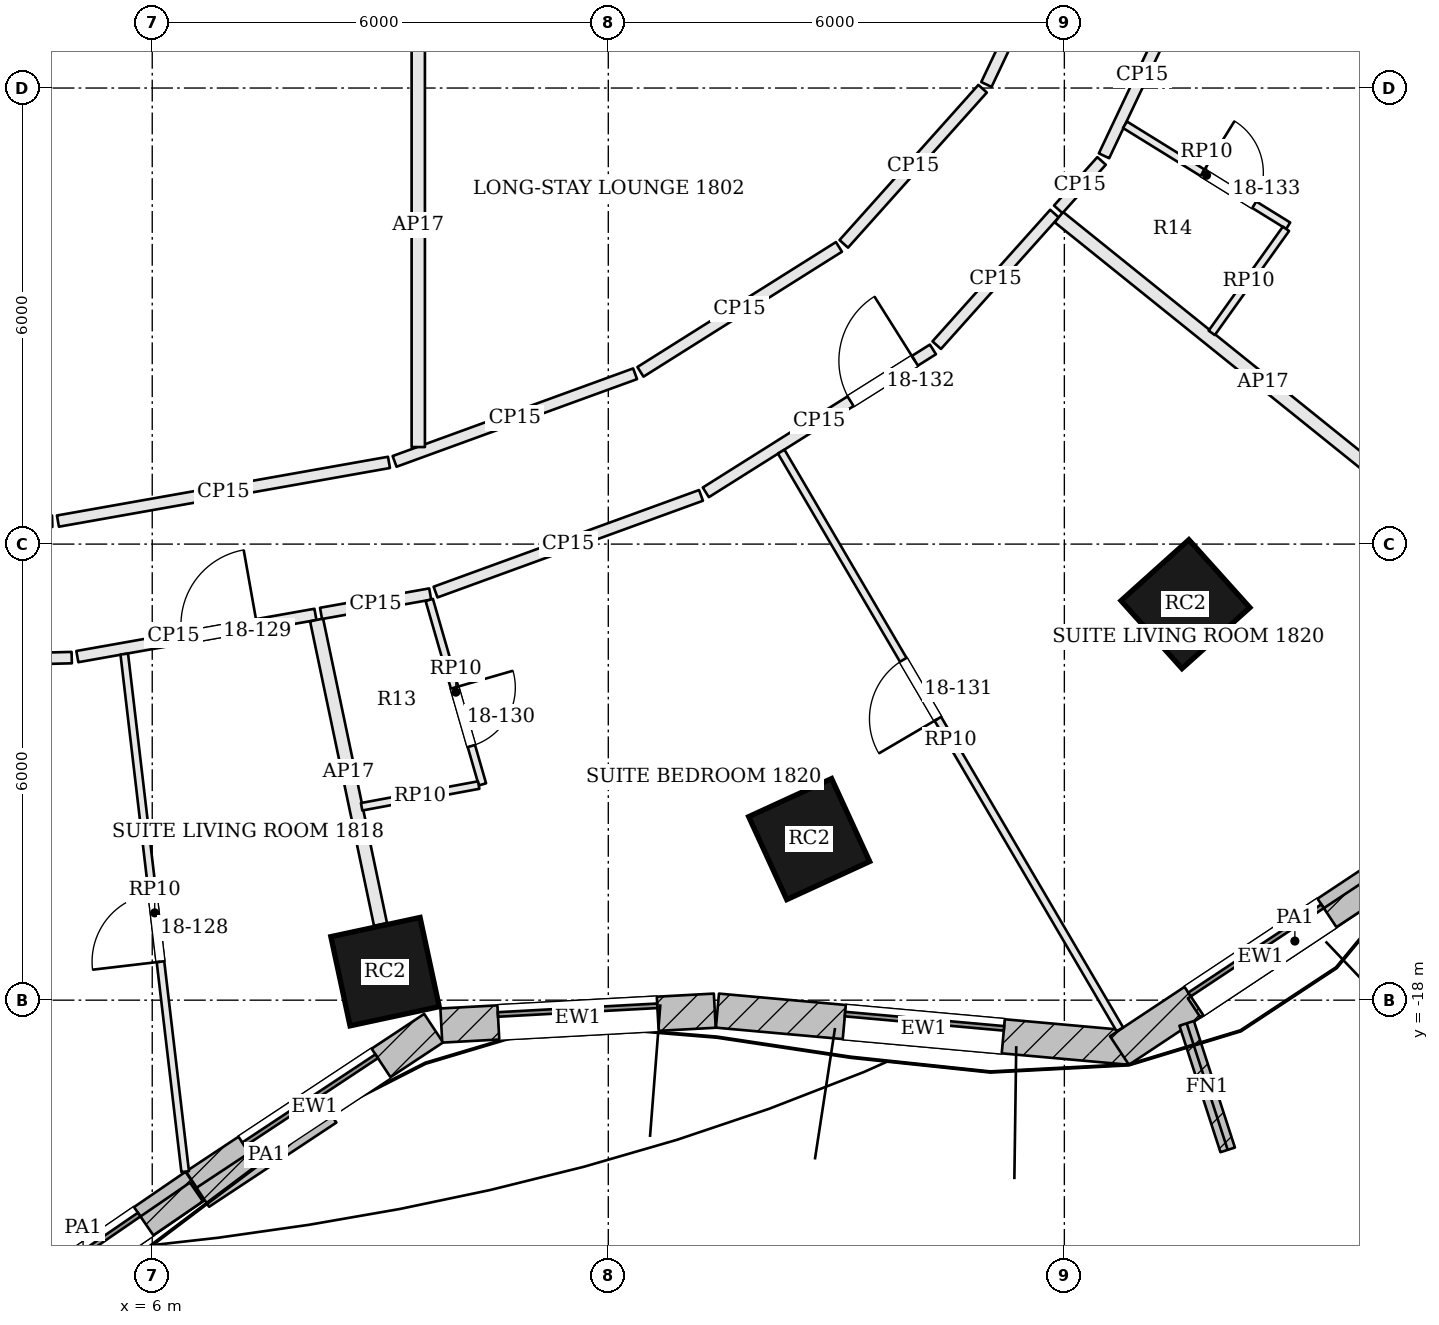
"""IFC4 building model, lengths in metres.
Left out: names, types, materials, properties, quantities, classifications, styles, units other than length and angle.
Written with IfcOpenShell. Run it as: python <this file> out.ifc"""

import sys

from ifc_helpers import new_model, si_unit, direction, frame, frame_2d, origin, origin_2d, place, context, subcontext, project, spatial, rectangle, extrude, element, fill, save


model = new_model("IFC4")
c1 = context("Model", 3, precision=1e-05, world=origin(), true_north=direction((0.0, 1.0)))
c2 = subcontext(c1, "Body", "Model", "MODEL_VIEW")
j1 = project(units=[si_unit("LENGTHUNIT", "METRE"), si_unit("PLANEANGLEUNIT", "RADIAN")], contexts=[c1])
p1 = place(None, origin())
s1 = spatial("IfcSite", under=j1, at=p1, CompositionType="ELEMENT")
p2 = place(p1, origin())
s2 = spatial("IfcBuilding", under=s1, at=p2, CompositionType="ELEMENT")
p3 = place(p2, frame((0.0, 0.0, 81.6)))
s3 = spatial("IfcBuildingStorey", under=s2, at=p3, CompositionType="ELEMENT", Elevation=81.6)
for number, where, z_axis, x_axis in (
    (1, (9.063, -17.625, -0.7), (0.0, 0.0, 1.0), (0.978, 0.21, 0.0)),
    (2, (14.643, -15.881, -0.7), (0.0, 0.0, 1.0), (0.909, 0.417, 0.0)),
    (3, (19.593, -12.79, -0.7), (0.0, 0.0, 1.0), (0.744, 0.668, 0.0)),
):
    element("IfcColumn", number, at=place(p3, frame(where, z_axis=z_axis, x_axis=x_axis)), inside=s3, PredefinedType="COLUMN", context=c2, shape_type="SweptSolid", body=[
        extrude(rectangle(XDim=1.2, YDim=1.2, at=origin_2d()), origin(), (0.0, 0.0, 1.0), 4.3),
    ])
p4 = place(p3, frame((3.479, -22.56, 0.0), z_axis=(0.0, 0.0, 1.0), x_axis=(0.824722766417, 0.565537230033, 0.0)))
e4 = element("IfcWall", 4, at=p4, inside=s3, PredefinedType="SOLIDWALL", context=c2, shape_type="SweptSolid", body=[
    extrude(rectangle(XDim=3.742, YDim=0.45, at=frame_2d((1.871, 0.0))), origin(), (0.0, 0.0, 1.0), 3.4),
])
p5 = place(p4, frame((0.821, 0.0, 0.9)))
e5 = element("IfcOpeningElement", 5, at=p5, cuts=e4, PredefinedType="OPENING", context=c2, shape_type="SweptSolid", body=[
    extrude(rectangle(XDim=2.1, YDim=2.0, at=frame_2d((1.05, 1.0))), frame((0.0, 0.235, 0.0), z_axis=(0.0, -1.0, 0.0), x_axis=(1.0, 0.0, 0.0)), (0.0, 0.0, 1.0), 0.47),
])
p6 = place(p3, frame((6.568, -20.441, 0.0), z_axis=(0.0, 0.0, 1.0), x_axis=(0.834034214531, 0.551712723246, 0.0)))
e6 = element("IfcWall", 6, at=p6, inside=s3, PredefinedType="SOLIDWALL", context=c2, shape_type="SweptSolid", body=[
    extrude(rectangle(XDim=3.757, YDim=0.45, at=frame_2d((1.879, 0.0))), origin(), (0.0, 0.0, 1.0), 3.4),
])
p7 = place(p6, frame((0.829, 0.0, 0.9)))
e7 = element("IfcOpeningElement", 7, at=p7, cuts=e6, PredefinedType="OPENING", context=c2, shape_type="SweptSolid", body=[
    extrude(rectangle(XDim=2.1, YDim=2.0, at=frame_2d((1.05, 1.0))), frame((0.0, 0.235, 0.0), z_axis=(0.0, -1.0, 0.0), x_axis=(1.0, 0.0, 0.0)), (0.0, 0.0, 1.0), 0.47),
])
p8 = place(p3, frame((9.803, -18.334, 0.0), z_axis=(0.0, 0.0, 1.0), x_axis=(0.998525941495, 0.054276552602, 0.0)))
e8 = element("IfcWall", 8, at=p8, inside=s3, PredefinedType="SOLIDWALL", context=c2, shape_type="SweptSolid", body=[
    extrude(rectangle(XDim=3.603, YDim=0.45, at=frame_2d((1.802, 0.0))), origin(), (0.0, 0.0, 1.0), 3.4),
])
p9 = place(p8, frame((0.751, 0.0, 0.9)))
e9 = element("IfcOpeningElement", 9, at=p9, cuts=e8, PredefinedType="OPENING", context=c2, shape_type="SweptSolid", body=[
    extrude(rectangle(XDim=2.1, YDim=2.0, at=frame_2d((1.05, 1.0))), frame((0.0, 0.235, 0.0), z_axis=(0.0, -1.0, 0.0), x_axis=(1.0, 0.0, 0.0)), (0.0, 0.0, 1.0), 0.47),
])
p10 = place(p3, frame((13.436, -18.138, 0.0), z_axis=(0.0, 0.0, 1.0), x_axis=(0.99598810213, -0.089485755376, 0.0)))
e10 = element("IfcWall", 10, at=p10, inside=s3, PredefinedType="SOLIDWALL", context=c2, shape_type="SweptSolid", body=[
    extrude(rectangle(XDim=5.451, YDim=0.45, at=frame_2d((2.726, 0.0))), origin(), (0.0, 0.0, 1.0), 3.4),
])
p11 = place(p10, frame((1.676, 0.0, 0.9)))
e11 = element("IfcOpeningElement", 11, at=p11, cuts=e10, PredefinedType="OPENING", context=c2, shape_type="SweptSolid", body=[
    extrude(rectangle(XDim=2.1, YDim=2.0, at=frame_2d((1.05, 1.0))), frame((0.0, 0.235, 0.0), z_axis=(0.0, -1.0, 0.0), x_axis=(1.0, 0.0, 0.0)), (0.0, 0.0, 1.0), 0.47),
])
p12 = place(p3, frame((18.726, -18.663, 0.0), z_axis=(0.0, 0.0, 1.0), x_axis=(0.83333921474, 0.552761931736, 0.0)))
e12 = element("IfcWall", 12, at=p12, inside=s3, PredefinedType="SOLIDWALL", context=c2, shape_type="SweptSolid", body=[
    extrude(rectangle(XDim=4.451, YDim=0.45, at=frame_2d((2.225, 0.0))), origin(), (0.0, 0.0, 1.0), 3.4),
])
p13 = place(p12, frame((1.175, 0.0, 0.9)))
e13 = element("IfcOpeningElement", 13, at=p13, cuts=e12, PredefinedType="OPENING", context=c2, shape_type="SweptSolid", body=[
    extrude(rectangle(XDim=2.1, YDim=2.0, at=frame_2d((1.05, 1.0))), frame((0.0, 0.235, 0.0), z_axis=(0.0, -1.0, 0.0), x_axis=(1.0, 0.0, 0.0)), (0.0, 0.0, 1.0), 0.47),
])
p14 = place(p3, frame((19.609, -18.305, 0.0), z_axis=(0.0, 0.0, 1.0), x_axis=(0.308600224758, -0.951191832008, 0.0)))
e14 = element("IfcWall", 14, at=p14, inside=s3, PredefinedType="SOLIDWALL", context=c2, shape_type="SweptSolid", body=[
    extrude(rectangle(XDim=1.75, YDim=0.2, at=frame_2d((0.875, 0.0))), origin(), (0.0, 0.0, 1.0), 3.4),
])
p15 = place(p3, frame((3.599, -22.568, 3.6), z_axis=(0.0, 0.0, 1.0), x_axis=(0.82476034254, 0.565482428881, 0.0)))
e15 = element("IfcWall", 15, at=p15, inside=s3, PredefinedType="PARAPET", context=c2, shape_type="SweptSolid", body=[
    extrude(rectangle(XDim=3.616, YDim=0.3, at=frame_2d((1.808, 0.0))), origin(), (0.0, 0.0, 1.0), 1.1),
])
p16 = place(p3, frame((6.665, -20.593, 3.6), z_axis=(0.0, 0.0, 1.0), x_axis=(0.834027642059, 0.551722658843, 0.0)))
e16 = element("IfcWall", 16, at=p16, inside=s3, PredefinedType="PARAPET", context=c2, shape_type="SweptSolid", body=[
    extrude(rectangle(XDim=2.008, YDim=0.3, at=frame_2d((1.004, 0.0))), origin(), (0.0, 0.0, 1.0), 1.1),
])
p17 = place(p3, frame((19.708, -18.101, 3.6), z_axis=(0.0, 0.0, 1.0), x_axis=(0.833370664286, 0.552714515738, 0.0)))
e17 = element("IfcWall", 17, at=p17, inside=s3, PredefinedType="PARAPET", context=c2, shape_type="SweptSolid", body=[
    extrude(rectangle(XDim=3.18, YDim=0.3, at=frame_2d((1.59, 0.0))), origin(), (0.0, 0.0, 1.0), 1.1),
])
p18 = place(p3, frame((0.132, -13.618, 0.0), z_axis=(0.0, 0.0, 1.0), x_axis=(0.999664963682, 0.025883593008, 0.0)))
e18 = element("IfcWall", 18, at=p18, inside=s3, PredefinedType="PARTITIONING", context=c2, shape_type="SweptSolid", body=[
    extrude(rectangle(XDim=4.811, YDim=0.15, at=frame_2d((2.405, 0.0))), origin(), (0.0, 0.0, 1.0), 2.784),
])
p19 = place(p3, frame((5.015, -13.48, 0.0), z_axis=(0.0, 0.0, 1.0), x_axis=(0.984640294338, 0.174595219768, 0.0)))
e19 = element("IfcWall", 19, at=p19, inside=s3, PredefinedType="PARTITIONING", context=c2, shape_type="SweptSolid", body=[
    extrude(rectangle(XDim=3.181, YDim=0.15, at=frame_2d((1.591, 0.0))), origin(), (0.0, 0.0, 1.0), 2.784),
])
p20 = place(p19, frame((1.4, 0.0, 0.0)))
e20 = element("IfcOpeningElement", 20, at=p20, cuts=e19, PredefinedType="OPENING", context=c2, shape_type="SweptSolid", body=[
    extrude(rectangle(XDim=1.0, YDim=2.1, at=frame_2d((0.5, 1.05))), frame((0.0, 0.085, 0.0), z_axis=(0.0, -1.0, 0.0), x_axis=(1.0, 0.0, 0.0)), (0.0, 0.0, 1.0), 0.17),
])
p21 = place(p3, frame((9.003, -17.004, 0.0), z_axis=(0.0, 0.0, 1.0), x_axis=(-0.205490383359, 0.978659134912, 0.0)))
e21 = element("IfcWall", 21, at=p21, inside=s3, PredefinedType="PARTITIONING", context=c2, shape_type="SweptSolid", body=[
    extrude(rectangle(XDim=4.093, YDim=0.175, at=frame_2d((2.046, 0.0))), origin(), (0.0, 0.0, 1.0), 2.784),
])
p22 = place(p3, frame((8.221, -12.912, 0.0), z_axis=(0.0, 0.0, 1.0), x_axis=(0.984645082055, 0.174568216995, 0.0)))
e22 = element("IfcWall", 22, at=p22, inside=s3, PredefinedType="PARTITIONING", context=c2, shape_type="SweptSolid", body=[
    extrude(rectangle(XDim=1.459, YDim=0.15, at=frame_2d((0.729, 0.0))), origin(), (0.0, 0.0, 1.0), 2.784),
])
p23 = place(p3, frame((9.728, -12.631, 0.0), z_axis=(0.0, 0.0, 1.0), x_axis=(0.939626438181, 0.342201923826, 0.0)))
e23 = element("IfcWall", 23, at=p23, inside=s3, PredefinedType="PARTITIONING", context=c2, shape_type="SweptSolid", body=[
    extrude(rectangle(XDim=3.716, YDim=0.15, at=frame_2d((1.858, 0.0))), origin(), (0.0, 0.0, 1.0), 2.784),
])
p24 = place(p3, frame((13.283, -11.319, 0.0), z_axis=(0.0, 0.0, 1.0), x_axis=(0.84630789582, 0.532694044901, 0.0)))
e24 = element("IfcWall", 24, at=p24, inside=s3, PredefinedType="PARTITIONING", context=c2, shape_type="SweptSolid", body=[
    extrude(rectangle(XDim=3.53, YDim=0.15, at=frame_2d((1.765, 0.0))), origin(), (0.0, 0.0, 1.0), 2.784),
])
p25 = place(p24, frame((2.25, 0.0, 0.0)))
e25 = element("IfcOpeningElement", 25, at=p25, cuts=e24, PredefinedType="OPENING", context=c2, shape_type="SweptSolid", body=[
    extrude(rectangle(XDim=1.0, YDim=2.1, at=frame_2d((0.5, 1.05))), frame((0.0, 0.085, 0.0), z_axis=(0.0, -1.0, 0.0), x_axis=(1.0, 0.0, 0.0)), (0.0, 0.0, 1.0), 0.17),
])
p26 = place(p3, frame((16.321, -9.383, 0.0), z_axis=(0.0, 0.0, 1.0), x_axis=(0.666871661175, 0.745172589083, 0.0)))
e26 = element("IfcWall", 26, at=p26, inside=s3, PredefinedType="PARTITIONING", context=c2, shape_type="SweptSolid", body=[
    extrude(rectangle(XDim=2.323, YDim=0.15, at=frame_2d((1.162, 0.0))), origin(), (0.0, 0.0, 1.0), 2.784),
])
p27 = place(p3, frame((23.302, -12.023, 0.0), z_axis=(0.0, 0.0, 1.0), x_axis=(-0.779049211338, 0.626962779049, 0.0)))
e27 = element("IfcWall", 27, at=p27, inside=s3, PredefinedType="PARTITIONING", context=c2, shape_type="SweptSolid", body=[
    extrude(rectangle(XDim=6.898, YDim=0.175, at=frame_2d((3.449, 0.0))), origin(), (0.0, 0.0, 1.0), 2.784),
])
p28 = place(p3, frame((17.92, -7.596, 0.0), z_axis=(0.0, 0.0, 1.0), x_axis=(0.666719674525, 0.745308577437, 0.0)))
e28 = element("IfcWall", 28, at=p28, inside=s3, PredefinedType="PARTITIONING", context=c2, shape_type="SweptSolid", body=[
    extrude(rectangle(XDim=0.854, YDim=0.15, at=frame_2d((0.427, 0.0))), origin(), (0.0, 0.0, 1.0), 2.784),
])
p29 = place(p3, frame((18.522, -6.891, 0.0), z_axis=(0.0, 0.0, 1.0), x_axis=(0.428157819028, 0.903703979191, 0.0)))
e29 = element("IfcWall", 29, at=p29, inside=s3, PredefinedType="PARTITIONING", context=c2, shape_type="SweptSolid", body=[
    extrude(rectangle(XDim=2.349, YDim=0.15, at=frame_2d((1.175, 0.0))), origin(), (0.0, 0.0, 1.0), 2.784),
])
p30 = place(p3, frame((17.79, -4.231, 0.0), z_axis=(0.0, 0.0, 1.0), x_axis=(-0.428042272357, -0.90375871397, 0.0)))
e30 = element("IfcWall", 30, at=p30, inside=s3, PredefinedType="PARTITIONING", context=c2, shape_type="SweptSolid", body=[
    extrude(rectangle(XDim=1.905, YDim=0.15, at=frame_2d((0.953, 0.0))), origin(), (0.0, 0.0, 1.0), 2.784),
])
p31 = place(p3, frame((16.925, -6.009, 0.0), z_axis=(0.0, 0.0, 1.0), x_axis=(-0.666893859891, -0.745152722359, 0.0)))
e31 = element("IfcWall", 31, at=p31, inside=s3, PredefinedType="PARTITIONING", context=c2, shape_type="SweptSolid", body=[
    extrude(rectangle(XDim=2.739, YDim=0.15, at=frame_2d((1.37, 0.0))), origin(), (0.0, 0.0, 1.0), 2.784),
])
p32 = place(p3, frame((15.034, -8.09, 0.0), z_axis=(0.0, 0.0, 1.0), x_axis=(-0.846322679414, -0.532670557014, 0.0)))
e32 = element("IfcWall", 32, at=p32, inside=s3, PredefinedType="PARTITIONING", context=c2, shape_type="SweptSolid", body=[
    extrude(rectangle(XDim=3.085, YDim=0.15, at=frame_2d((1.543, 0.0))), origin(), (0.0, 0.0, 1.0), 2.784),
])
p33 = place(p3, frame((12.353, -9.76, 0.0), z_axis=(0.0, 0.0, 1.0), x_axis=(-0.939632450309, -0.342185415127, 0.0)))
e33 = element("IfcWall", 33, at=p33, inside=s3, PredefinedType="PARTITIONING", context=c2, shape_type="SweptSolid", body=[
    extrude(rectangle(XDim=3.368, YDim=0.15, at=frame_2d((1.684, 0.0))), origin(), (0.0, 0.0, 1.0), 2.784),
])
p34 = place(p3, frame((9.115, -10.925, 0.0), z_axis=(0.0, 0.0, 1.0), x_axis=(-0.984632605417, -0.174638576352, 0.0)))
e34 = element("IfcWall", 34, at=p34, inside=s3, PredefinedType="PARTITIONING", context=c2, shape_type="SweptSolid", body=[
    extrude(rectangle(XDim=4.423, YDim=0.15, at=frame_2d((2.211, 0.0))), origin(), (0.0, 0.0, 1.0), 2.784),
])
p35 = place(p3, frame((4.684, -11.699, 0.0), z_axis=(0.0, 0.0, 1.0), x_axis=(-0.999663438204, -0.025942442425, 0.0)))
e35 = element("IfcWall", 35, at=p35, inside=s3, PredefinedType="PARTITIONING", context=c2, shape_type="SweptSolid", body=[
    extrude(rectangle(XDim=6.663, YDim=0.15, at=frame_2d((3.332, 0.0))), origin(), (0.0, 0.0, 1.0), 2.784),
])
p36 = place(p3, frame((6.433, -20.256, 0.0), z_axis=(0.0, 0.0, 1.0), x_axis=(-0.116866039573, 0.993147687303, 0.0)))
e36 = element("IfcWall", 36, at=p36, inside=s3, PredefinedType="PARTITIONING", context=c2, shape_type="SweptSolid", body=[
    extrude(rectangle(XDim=6.856, YDim=0.1, at=frame_2d((3.428, 0.0))), origin(), (0.0, 0.0, 1.0), 2.784),
])
p37 = place(p36, frame((2.781, 0.0, 0.0)))
e37 = element("IfcOpeningElement", 37, at=p37, cuts=e36, PredefinedType="OPENING", context=c2, shape_type="SweptSolid", body=[
    extrude(rectangle(XDim=0.9, YDim=2.4, at=frame_2d((0.45, 1.2))), frame((0.0, 0.06, 0.0), z_axis=(0.0, -1.0, 0.0), x_axis=(1.0, 0.0, 0.0)), (0.0, 0.0, 1.0), 0.12),
])
p38 = place(p3, frame((18.73, -18.384, 0.0), z_axis=(0.0, 0.0, 1.0), x_axis=(-0.50573941389, 0.862686295961, 0.0)))
e38 = element("IfcWall", 38, at=p38, inside=s3, PredefinedType="PARTITIONING", context=c2, shape_type="SweptSolid", body=[
    extrude(rectangle(XDim=8.81, YDim=0.1, at=frame_2d((4.405, 0.0))), origin(), (0.0, 0.0, 1.0), 2.784),
])
p39 = place(p38, frame((4.735, 0.0, 0.0)))
e39 = element("IfcOpeningElement", 39, at=p39, cuts=e38, PredefinedType="OPENING", context=c2, shape_type="SweptSolid", body=[
    extrude(rectangle(XDim=0.9, YDim=2.4, at=frame_2d((0.45, 1.2))), frame((0.0, 0.06, 0.0), z_axis=(0.0, -1.0, 0.0), x_axis=(1.0, 0.0, 0.0)), (0.0, 0.0, 1.0), 0.12),
])
p40 = place(p3, frame((9.645, -12.735, 0.0), z_axis=(0.0, 0.0, 1.0), x_axis=(0.27694262008, -0.960886458008, 0.0)))
e40 = element("IfcWall", 40, at=p40, inside=s3, PredefinedType="PARTITIONING", context=c2, shape_type="SweptSolid", body=[
    extrude(rectangle(XDim=2.525, YDim=0.1, at=frame_2d((1.262, 0.0))), origin(), (0.0, 0.0, 1.0), 2.784),
])
p41 = place(p40, frame((1.2, 0.0, 0.0)))
e41 = element("IfcOpeningElement", 41, at=p41, cuts=e40, PredefinedType="OPENING", context=c2, shape_type="SweptSolid", body=[
    extrude(rectangle(XDim=0.8, YDim=2.1, at=frame_2d((0.4, 1.05))), frame((0.0, 0.06, 0.0), z_axis=(0.0, -1.0, 0.0), x_axis=(1.0, 0.0, 0.0)), (0.0, 0.0, 1.0), 0.12),
])
p42 = place(p3, frame((10.295, -15.17, 0.0), z_axis=(0.0, 0.0, 1.0), x_axis=(-0.983258222596, -0.182217638271, 0.0)))
e42 = element("IfcWall", 42, at=p42, inside=s3, PredefinedType="PARTITIONING", context=c2, shape_type="SweptSolid", body=[
    extrude(rectangle(XDim=1.566, YDim=0.1, at=frame_2d((0.783, 0.0))), origin(), (0.0, 0.0, 1.0), 2.784),
])
p43 = place(p3, frame((18.798, -6.483, 0.0), z_axis=(0.0, 0.0, 1.0), x_axis=(0.850374338708, -0.526178186612, 0.0)))
e43 = element("IfcWall", 43, at=p43, inside=s3, PredefinedType="PARTITIONING", context=c2, shape_type="SweptSolid", body=[
    extrude(rectangle(XDim=2.525, YDim=0.1, at=frame_2d((1.263, 0.0))), origin(), (0.0, 0.0, 1.0), 2.784),
])
p44 = place(p43, frame((1.2, 0.0, 0.0)))
e44 = element("IfcOpeningElement", 44, at=p44, cuts=e43, PredefinedType="OPENING", context=c2, shape_type="SweptSolid", body=[
    extrude(rectangle(XDim=0.8, YDim=2.1, at=frame_2d((0.4, 1.05))), frame((0.0, 0.06, 0.0), z_axis=(0.0, -1.0, 0.0), x_axis=(1.0, 0.0, 0.0)), (0.0, 0.0, 1.0), 0.12),
])
p45 = place(p3, frame((20.916, -7.852, 0.0), z_axis=(0.0, 0.0, 1.0), x_axis=(-0.580922254291, -0.813959049627, 0.0)))
e45 = element("IfcWall", 45, at=p45, inside=s3, PredefinedType="PARTITIONING", context=c2, shape_type="SweptSolid", body=[
    extrude(rectangle(XDim=1.681, YDim=0.1, at=frame_2d((0.841, 0.0))), origin(), (0.0, 0.0, 1.0), 2.784),
])
p46 = place(p3, frame((9.5, -10.723, 0.0), z_axis=(0.0, 0.0, 1.0), x_axis=(0.0, 1.0, 0.0)))
e46 = element("IfcWall", 46, at=p46, inside=s3, PredefinedType="PARTITIONING", context=c2, shape_type="SweptSolid", body=[
    extrude(rectangle(XDim=5.848, YDim=0.175, at=frame_2d((2.924, 0.0))), origin(), (0.0, 0.0, 1.0), 2.784),
])
p47 = place(p5, origin())
e47 = element("IfcWindow", 47, at=p47, inside=s3, PartitioningType="SINGLE_PANEL", PredefinedType="WINDOW", context=c2, shape_type="SweptSolid", body=[
    extrude(rectangle(XDim=2.1, YDim=2.0, at=frame_2d((1.05, 1.0))), frame((0.0, 0.135, 0.0), z_axis=(0.0, -1.0, 0.0), x_axis=(1.0, 0.0, 0.0)), (0.0, 0.0, 1.0), 0.06),
])
fill(e5, e47)
p48 = place(p7, origin())
e48 = element("IfcWindow", 48, at=p48, inside=s3, PartitioningType="SINGLE_PANEL", PredefinedType="WINDOW", context=c2, shape_type="SweptSolid", body=[
    extrude(rectangle(XDim=2.1, YDim=2.0, at=frame_2d((1.05, 1.0))), frame((0.0, 0.135, 0.0), z_axis=(0.0, -1.0, 0.0), x_axis=(1.0, 0.0, 0.0)), (0.0, 0.0, 1.0), 0.06),
])
fill(e7, e48)
p49 = place(p9, origin())
e49 = element("IfcWindow", 49, at=p49, inside=s3, PartitioningType="SINGLE_PANEL", PredefinedType="WINDOW", context=c2, shape_type="SweptSolid", body=[
    extrude(rectangle(XDim=2.1, YDim=2.0, at=frame_2d((1.05, 1.0))), frame((0.0, 0.135, 0.0), z_axis=(0.0, -1.0, 0.0), x_axis=(1.0, 0.0, 0.0)), (0.0, 0.0, 1.0), 0.06),
])
fill(e9, e49)
p50 = place(p11, origin())
e50 = element("IfcWindow", 50, at=p50, inside=s3, PartitioningType="SINGLE_PANEL", PredefinedType="WINDOW", context=c2, shape_type="SweptSolid", body=[
    extrude(rectangle(XDim=2.1, YDim=2.0, at=frame_2d((1.05, 1.0))), frame((0.0, 0.135, 0.0), z_axis=(0.0, -1.0, 0.0), x_axis=(1.0, 0.0, 0.0)), (0.0, 0.0, 1.0), 0.06),
])
fill(e11, e50)
p51 = place(p13, origin())
e51 = element("IfcWindow", 51, at=p51, inside=s3, PartitioningType="SINGLE_PANEL", PredefinedType="WINDOW", context=c2, shape_type="SweptSolid", body=[
    extrude(rectangle(XDim=2.1, YDim=2.0, at=frame_2d((1.05, 1.0))), frame((0.0, 0.135, 0.0), z_axis=(0.0, -1.0, 0.0), x_axis=(1.0, 0.0, 0.0)), (0.0, 0.0, 1.0), 0.06),
])
fill(e13, e51)
p52 = place(p37, origin())
e52 = element("IfcDoor", 52, at=p52, inside=s3, OperationType="SINGLE_SWING_LEFT", PredefinedType="DOOR", context=c2, shape_type="SweptSolid", body=[
    extrude(rectangle(XDim=0.9, YDim=2.4, at=frame_2d((0.45, 1.2))), frame((0.0, 0.025, 0.0), z_axis=(0.0, -1.0, 0.0), x_axis=(1.0, 0.0, 0.0)), (0.0, 0.0, 1.0), 0.05),
])
fill(e37, e52)
p53 = place(p20, origin())
e53 = element("IfcDoor", 53, at=p53, inside=s3, OperationType="SINGLE_SWING_RIGHT", PredefinedType="DOOR", context=c2, shape_type="SweptSolid", body=[
    extrude(rectangle(XDim=1.0, YDim=2.1, at=frame_2d((0.5, 1.05))), frame((0.0, 0.025, 0.0), z_axis=(0.0, -1.0, 0.0), x_axis=(1.0, 0.0, 0.0)), (0.0, 0.0, 1.0), 0.05),
])
fill(e20, e53)
p54 = place(p41, origin())
e54 = element("IfcDoor", 54, at=p54, inside=s3, OperationType="SINGLE_SWING_LEFT", PredefinedType="DOOR", context=c2, shape_type="SweptSolid", body=[
    extrude(rectangle(XDim=0.8, YDim=2.1, at=frame_2d((0.4, 1.05))), frame((0.0, 0.025, 0.0), z_axis=(0.0, -1.0, 0.0), x_axis=(1.0, 0.0, 0.0)), (0.0, 0.0, 1.0), 0.05),
])
fill(e41, e54)
p55 = place(p39, origin())
e55 = element("IfcDoor", 55, at=p55, inside=s3, OperationType="SINGLE_SWING_LEFT", PredefinedType="DOOR", context=c2, shape_type="SweptSolid", body=[
    extrude(rectangle(XDim=0.9, YDim=2.4, at=frame_2d((0.45, 1.2))), frame((0.0, 0.025, 0.0), z_axis=(0.0, -1.0, 0.0), x_axis=(1.0, 0.0, 0.0)), (0.0, 0.0, 1.0), 0.05),
])
fill(e39, e55)
p56 = place(p25, origin())
e56 = element("IfcDoor", 56, at=p56, inside=s3, OperationType="SINGLE_SWING_RIGHT", PredefinedType="DOOR", context=c2, shape_type="SweptSolid", body=[
    extrude(rectangle(XDim=1.0, YDim=2.1, at=frame_2d((0.5, 1.05))), frame((0.0, 0.025, 0.0), z_axis=(0.0, -1.0, 0.0), x_axis=(1.0, 0.0, 0.0)), (0.0, 0.0, 1.0), 0.05),
])
fill(e25, e56)
p57 = place(p44, origin())
e57 = element("IfcDoor", 57, at=p57, inside=s3, OperationType="SINGLE_SWING_LEFT", PredefinedType="DOOR", context=c2, shape_type="SweptSolid", body=[
    extrude(rectangle(XDim=0.8, YDim=2.1, at=frame_2d((0.4, 1.05))), frame((0.0, 0.025, 0.0), z_axis=(0.0, -1.0, 0.0), x_axis=(1.0, 0.0, 0.0)), (0.0, 0.0, 1.0), 0.05),
])
fill(e44, e57)
save(model, sys.argv[1])
